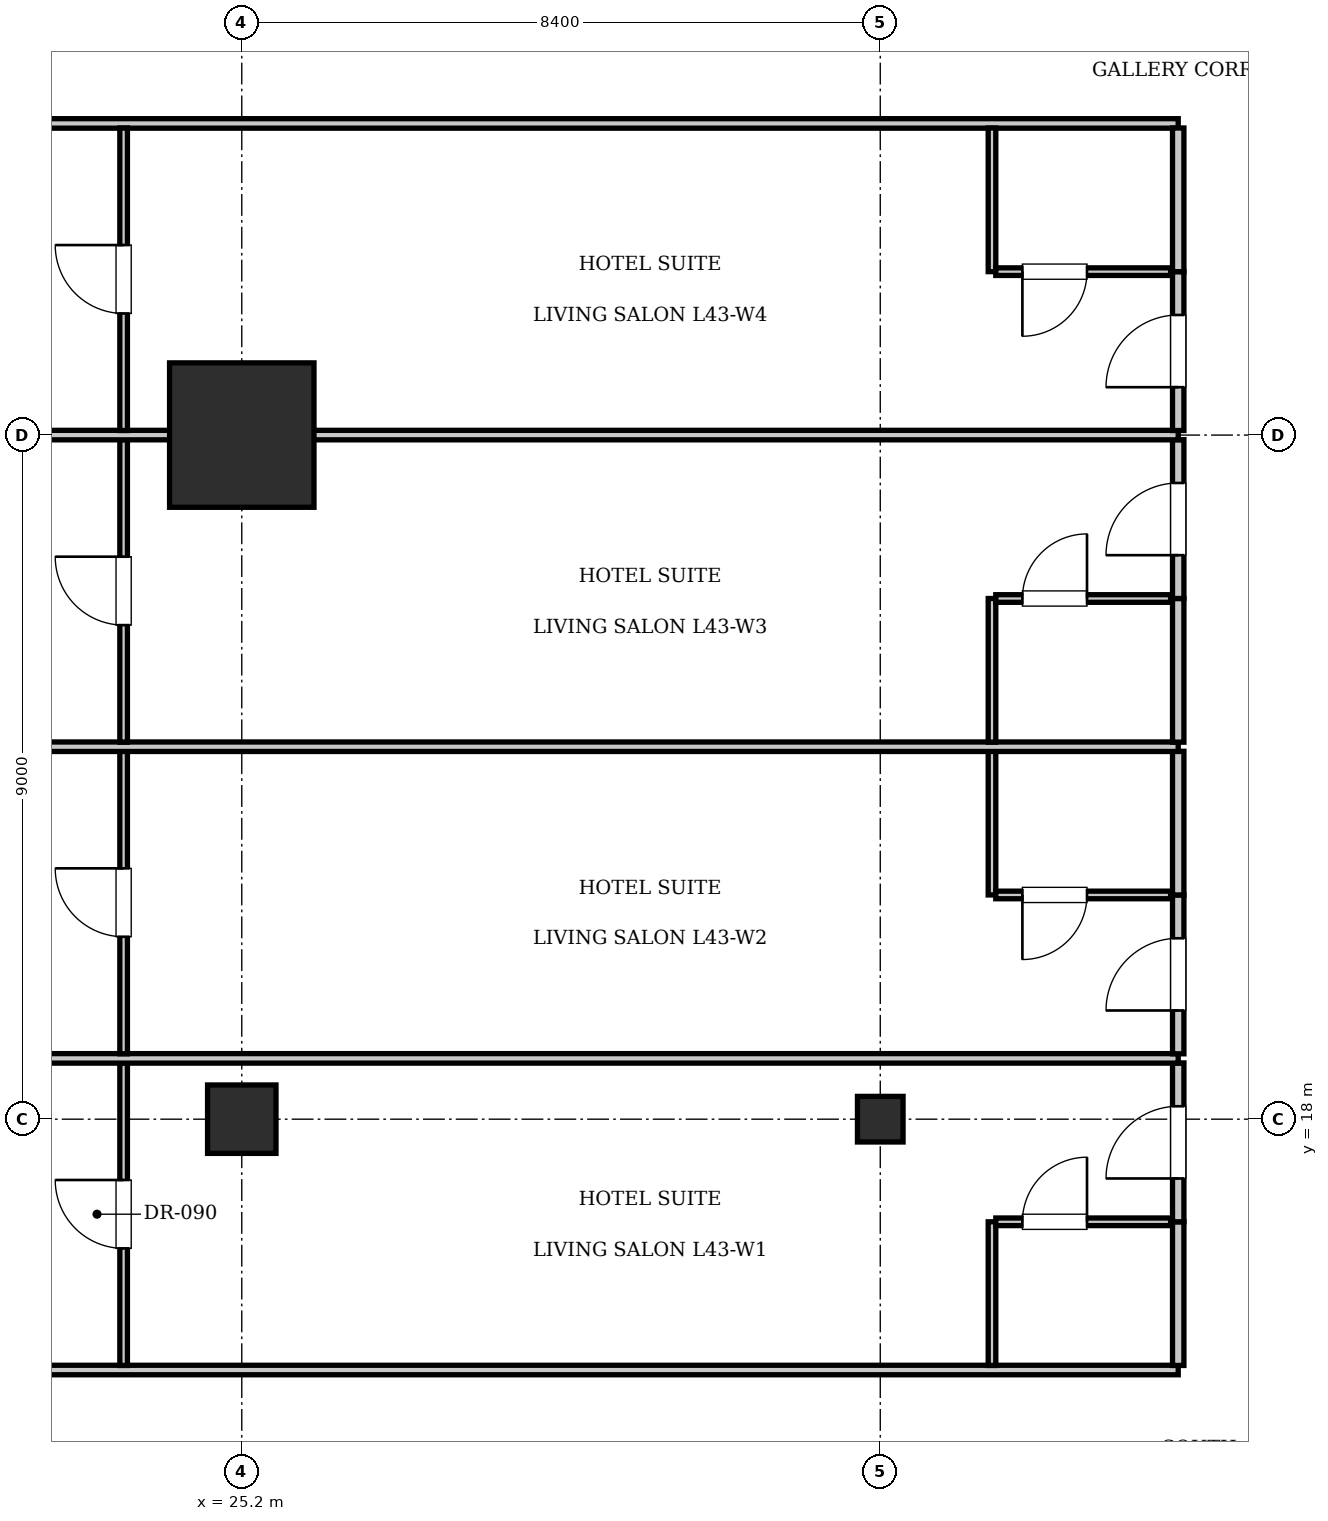
"""IFC4 building model, lengths in metres.
Left out: names, types, materials, properties, quantities, classifications, styles, units other than length and angle.
Written with IfcOpenShell. Run it as: python <this file> out.ifc"""

import sys

from ifc_helpers import new_model, si_unit, direction, frame, frame_2d, origin, origin_2d, place, context, subcontext, project, spatial, rectangle, i_section, extrude, element, fill, save


model = new_model("IFC4")
c1 = context("Model", 3, precision=1e-05, world=origin(), true_north=direction((0.0, 1.0)))
c2 = subcontext(c1, "Body", "Model", "MODEL_VIEW")
j1 = project(units=[si_unit("LENGTHUNIT", "METRE"), si_unit("PLANEANGLEUNIT", "RADIAN")], contexts=[c1])
p1 = place(None, origin())
s1 = spatial("IfcSite", under=j1, at=p1, CompositionType="ELEMENT")
p2 = place(p1, origin())
s2 = spatial("IfcBuilding", under=s1, at=p2, CompositionType="ELEMENT")
p3 = place(p2, frame((0.0, 0.0, 177.45)))
s3 = spatial("IfcBuildingStorey", under=s2, at=p3, CompositionType="ELEMENT", Elevation=177.45)
p4 = place(p3, frame((25.2, 27.0, 0.0), z_axis=(0.0, 0.0, 1.0), x_axis=(1.0, 0.0, 0.0)))
e1 = element("IfcColumn", 1, at=p4, inside=s3, PredefinedType="COLUMN", context=c2, shape_type="SweptSolid", body=[
    extrude(rectangle(XDim=1.9, YDim=1.9, at=origin_2d()), origin(), (0.0, 0.0, 1.0), 3.85),
])
p5 = place(p3, frame((25.2, 18.0, 0.0), z_axis=(0.0, 0.0, 1.0), x_axis=(1.0, 0.0, 0.0)))
e2 = element("IfcColumn", 2, at=p5, inside=s3, PredefinedType="COLUMN", context=c2, shape_type="SweptSolid", body=[
    extrude(rectangle(XDim=0.9, YDim=0.9, at=origin_2d()), origin(), (0.0, 0.0, 1.0), 3.85),
])
p6 = place(p3, frame((33.6, 18.0, 0.0), z_axis=(0.0, 0.0, 1.0), x_axis=(1.0, 0.0, 0.0)))
e3 = element("IfcColumn", 3, at=p6, inside=s3, PredefinedType="COLUMN", context=c2, shape_type="SweptSolid", body=[
    extrude(i_section(OverallWidth=0.6, OverallDepth=0.6, WebThickness=0.025, FlangeThickness=0.038, at=origin_2d()), origin(), (0.0, 0.0, 1.0), 3.85),
])
for number, where, z_axis, x_axis in (
    (4, (13.2, 14.7, 0.0), (0.0, 0.0, 1.0), (1.0, 0.0, 0.0)),
    (5, (13.2, 31.1, 0.0), (0.0, 0.0, 1.0), (1.0, 0.0, 0.0)),
):
    element("IfcWall", number, at=place(p3, frame(where, z_axis=z_axis, x_axis=x_axis)), inside=s3, PredefinedType="PARTITIONING", context=c2, shape_type="SweptSolid", body=[
        extrude(rectangle(XDim=24.32, YDim=0.125, at=frame_2d((12.16, 0.0))), origin(), (0.0, 0.0, 1.0), 3.61),
    ])
p7 = place(p3, frame((37.52, 14.76, 0.0), z_axis=(0.0, 0.0, 1.0), x_axis=(0.0, 1.0, 0.0)))
e6 = element("IfcWall", 6, at=p7, inside=s3, PredefinedType="PARTITIONING", context=c2, shape_type="SweptSolid", body=[
    extrude(rectangle(XDim=1.89, YDim=0.15, at=frame_2d((0.945, 0.0))), origin(), (0.0, 0.0, 1.0), 3.61),
])
p8 = place(p3, frame((37.52, 16.65, 0.0), z_axis=(0.0, 0.0, 1.0), x_axis=(0.0, 1.0, 0.0)))
e7 = element("IfcWall", 7, at=p8, inside=s3, PredefinedType="PARTITIONING", context=c2, shape_type="SweptSolid", body=[
    extrude(rectangle(XDim=2.09, YDim=0.15, at=frame_2d((1.045, 0.0))), origin(), (0.0, 0.0, 1.0), 3.61),
])
p9 = place(p8, frame((0.57, 0.0, 0.0)))
e8 = element("IfcOpeningElement", 8, at=p9, cuts=e7, PredefinedType="OPENING", context=c2, shape_type="SweptSolid", body=[
    extrude(rectangle(XDim=0.95, YDim=2.15, at=frame_2d((0.475, 1.075))), frame((0.0, 0.085, 0.0), z_axis=(0.0, -1.0, 0.0), x_axis=(1.0, 0.0, 0.0)), (0.0, 0.0, 1.0), 0.17),
])
p10 = place(p3, frame((35.07, 14.76, 0.0), z_axis=(0.0, 0.0, 1.0), x_axis=(0.0, 1.0, 0.0)))
e9 = element("IfcWall", 9, at=p10, inside=s3, PredefinedType="PARTITIONING", context=c2, shape_type="SweptSolid", body=[
    extrude(rectangle(XDim=1.89, YDim=0.1, at=frame_2d((0.945, 0.0))), origin(), (0.0, 0.0, 1.0), 3.61),
])
p11 = place(p3, frame((35.12, 16.65, 0.0), z_axis=(0.0, 0.0, 1.0), x_axis=(1.0, 0.0, 0.0)))
e10 = element("IfcWall", 10, at=p11, inside=s3, PredefinedType="PARTITIONING", context=c2, shape_type="SweptSolid", body=[
    extrude(rectangle(XDim=2.3, YDim=0.1, at=frame_2d((1.15, 0.0))), origin(), (0.0, 0.0, 1.0), 3.61),
])
p12 = place(p11, frame((0.35, 0.0, 0.0)))
e11 = element("IfcOpeningElement", 11, at=p12, cuts=e10, PredefinedType="OPENING", context=c2, shape_type="SweptSolid", body=[
    extrude(rectangle(XDim=0.85, YDim=2.1, at=frame_2d((0.425, 1.05))), frame((0.0, 0.06, 0.0), z_axis=(0.0, -1.0, 0.0), x_axis=(1.0, 0.0, 0.0)), (0.0, 0.0, 1.0), 0.12),
])
p13 = place(p3, frame((23.646, 14.76, 0.0), z_axis=(0.0, 0.0, 1.0), x_axis=(0.0, 1.0, 0.0)))
e12 = element("IfcWall", 12, at=p13, inside=s3, PredefinedType="PARTITIONING", context=c2, shape_type="SweptSolid", body=[
    extrude(rectangle(XDim=3.98, YDim=0.1, at=frame_2d((1.99, 0.0))), origin(), (0.0, 0.0, 1.0), 3.61),
])
p14 = place(p13, frame((1.54, 0.0, 0.0)))
e13 = element("IfcOpeningElement", 13, at=p14, cuts=e12, PredefinedType="OPENING", context=c2, shape_type="SweptSolid", body=[
    extrude(rectangle(XDim=0.9, YDim=2.1, at=frame_2d((0.45, 1.05))), frame((0.0, 0.06, 0.0), z_axis=(0.0, -1.0, 0.0), x_axis=(1.0, 0.0, 0.0)), (0.0, 0.0, 1.0), 0.12),
])
p15 = place(p3, frame((13.2, 18.8, 0.0), z_axis=(0.0, 0.0, 1.0), x_axis=(1.0, 0.0, 0.0)))
e14 = element("IfcWall", 14, at=p15, inside=s3, PredefinedType="PARTITIONING", context=c2, shape_type="SweptSolid", body=[
    extrude(rectangle(XDim=24.32, YDim=0.125, at=frame_2d((12.16, 0.0))), origin(), (0.0, 0.0, 1.0), 3.61),
])
p16 = place(p3, frame((37.52, 18.86, 0.0), z_axis=(0.0, 0.0, 1.0), x_axis=(0.0, 1.0, 0.0)))
e15 = element("IfcWall", 15, at=p16, inside=s3, PredefinedType="PARTITIONING", context=c2, shape_type="SweptSolid", body=[
    extrude(rectangle(XDim=2.09, YDim=0.15, at=frame_2d((1.045, 0.0))), origin(), (0.0, 0.0, 1.0), 3.61),
])
p17 = place(p16, frame((0.57, 0.0, 0.0)))
e16 = element("IfcOpeningElement", 16, at=p17, cuts=e15, PredefinedType="OPENING", context=c2, shape_type="SweptSolid", body=[
    extrude(rectangle(XDim=0.95, YDim=2.15, at=frame_2d((0.475, 1.075))), frame((0.0, 0.085, 0.0), z_axis=(0.0, -1.0, 0.0), x_axis=(1.0, 0.0, 0.0)), (0.0, 0.0, 1.0), 0.17),
])
p18 = place(p3, frame((37.52, 20.95, 0.0), z_axis=(0.0, 0.0, 1.0), x_axis=(0.0, 1.0, 0.0)))
e17 = element("IfcWall", 17, at=p18, inside=s3, PredefinedType="PARTITIONING", context=c2, shape_type="SweptSolid", body=[
    extrude(rectangle(XDim=1.89, YDim=0.15, at=frame_2d((0.945, 0.0))), origin(), (0.0, 0.0, 1.0), 3.61),
])
p19 = place(p3, frame((35.07, 20.95, 0.0), z_axis=(0.0, 0.0, 1.0), x_axis=(0.0, 1.0, 0.0)))
e18 = element("IfcWall", 18, at=p19, inside=s3, PredefinedType="PARTITIONING", context=c2, shape_type="SweptSolid", body=[
    extrude(rectangle(XDim=1.89, YDim=0.1, at=frame_2d((0.945, 0.0))), origin(), (0.0, 0.0, 1.0), 3.61),
])
p20 = place(p3, frame((35.12, 20.95, 0.0), z_axis=(0.0, 0.0, 1.0), x_axis=(1.0, 0.0, 0.0)))
e19 = element("IfcWall", 19, at=p20, inside=s3, PredefinedType="PARTITIONING", context=c2, shape_type="SweptSolid", body=[
    extrude(rectangle(XDim=2.3, YDim=0.1, at=frame_2d((1.15, 0.0))), origin(), (0.0, 0.0, 1.0), 3.61),
])
p21 = place(p20, frame((0.35, 0.0, 0.0)))
e20 = element("IfcOpeningElement", 20, at=p21, cuts=e19, PredefinedType="OPENING", context=c2, shape_type="SweptSolid", body=[
    extrude(rectangle(XDim=0.85, YDim=2.1, at=frame_2d((0.425, 1.05))), frame((0.0, 0.06, 0.0), z_axis=(0.0, -1.0, 0.0), x_axis=(1.0, 0.0, 0.0)), (0.0, 0.0, 1.0), 0.12),
])
p22 = place(p3, frame((23.646, 18.86, 0.0), z_axis=(0.0, 0.0, 1.0), x_axis=(0.0, 1.0, 0.0)))
e21 = element("IfcWall", 21, at=p22, inside=s3, PredefinedType="PARTITIONING", context=c2, shape_type="SweptSolid", body=[
    extrude(rectangle(XDim=3.98, YDim=0.1, at=frame_2d((1.99, 0.0))), origin(), (0.0, 0.0, 1.0), 3.61),
])
p23 = place(p22, frame((1.54, 0.0, 0.0)))
e22 = element("IfcOpeningElement", 22, at=p23, cuts=e21, PredefinedType="OPENING", context=c2, shape_type="SweptSolid", body=[
    extrude(rectangle(XDim=0.9, YDim=2.1, at=frame_2d((0.45, 1.05))), frame((0.0, 0.06, 0.0), z_axis=(0.0, -1.0, 0.0), x_axis=(1.0, 0.0, 0.0)), (0.0, 0.0, 1.0), 0.12),
])
p24 = place(p3, frame((13.2, 22.9, 0.0), z_axis=(0.0, 0.0, 1.0), x_axis=(1.0, 0.0, 0.0)))
e23 = element("IfcWall", 23, at=p24, inside=s3, PredefinedType="PARTITIONING", context=c2, shape_type="SweptSolid", body=[
    extrude(rectangle(XDim=24.32, YDim=0.125, at=frame_2d((12.16, 0.0))), origin(), (0.0, 0.0, 1.0), 3.61),
])
p25 = place(p3, frame((37.52, 22.96, 0.0), z_axis=(0.0, 0.0, 1.0), x_axis=(0.0, 1.0, 0.0)))
e24 = element("IfcWall", 24, at=p25, inside=s3, PredefinedType="PARTITIONING", context=c2, shape_type="SweptSolid", body=[
    extrude(rectangle(XDim=1.89, YDim=0.15, at=frame_2d((0.945, 0.0))), origin(), (0.0, 0.0, 1.0), 3.61),
])
p26 = place(p3, frame((37.52, 24.85, 0.0), z_axis=(0.0, 0.0, 1.0), x_axis=(0.0, 1.0, 0.0)))
e25 = element("IfcWall", 25, at=p26, inside=s3, PredefinedType="PARTITIONING", context=c2, shape_type="SweptSolid", body=[
    extrude(rectangle(XDim=2.09, YDim=0.15, at=frame_2d((1.045, 0.0))), origin(), (0.0, 0.0, 1.0), 3.61),
])
p27 = place(p26, frame((0.57, 0.0, 0.0)))
e26 = element("IfcOpeningElement", 26, at=p27, cuts=e25, PredefinedType="OPENING", context=c2, shape_type="SweptSolid", body=[
    extrude(rectangle(XDim=0.95, YDim=2.15, at=frame_2d((0.475, 1.075))), frame((0.0, 0.085, 0.0), z_axis=(0.0, -1.0, 0.0), x_axis=(1.0, 0.0, 0.0)), (0.0, 0.0, 1.0), 0.17),
])
p28 = place(p3, frame((35.07, 22.96, 0.0), z_axis=(0.0, 0.0, 1.0), x_axis=(0.0, 1.0, 0.0)))
e27 = element("IfcWall", 27, at=p28, inside=s3, PredefinedType="PARTITIONING", context=c2, shape_type="SweptSolid", body=[
    extrude(rectangle(XDim=1.89, YDim=0.1, at=frame_2d((0.945, 0.0))), origin(), (0.0, 0.0, 1.0), 3.61),
])
p29 = place(p3, frame((35.12, 24.85, 0.0), z_axis=(0.0, 0.0, 1.0), x_axis=(1.0, 0.0, 0.0)))
e28 = element("IfcWall", 28, at=p29, inside=s3, PredefinedType="PARTITIONING", context=c2, shape_type="SweptSolid", body=[
    extrude(rectangle(XDim=2.3, YDim=0.1, at=frame_2d((1.15, 0.0))), origin(), (0.0, 0.0, 1.0), 3.61),
])
p30 = place(p29, frame((0.35, 0.0, 0.0)))
e29 = element("IfcOpeningElement", 29, at=p30, cuts=e28, PredefinedType="OPENING", context=c2, shape_type="SweptSolid", body=[
    extrude(rectangle(XDim=0.85, YDim=2.1, at=frame_2d((0.425, 1.05))), frame((0.0, 0.06, 0.0), z_axis=(0.0, -1.0, 0.0), x_axis=(1.0, 0.0, 0.0)), (0.0, 0.0, 1.0), 0.12),
])
p31 = place(p3, frame((23.646, 22.96, 0.0), z_axis=(0.0, 0.0, 1.0), x_axis=(0.0, 1.0, 0.0)))
e30 = element("IfcWall", 30, at=p31, inside=s3, PredefinedType="PARTITIONING", context=c2, shape_type="SweptSolid", body=[
    extrude(rectangle(XDim=3.98, YDim=0.1, at=frame_2d((1.99, 0.0))), origin(), (0.0, 0.0, 1.0), 3.61),
])
p32 = place(p31, frame((1.54, 0.0, 0.0)))
e31 = element("IfcOpeningElement", 31, at=p32, cuts=e30, PredefinedType="OPENING", context=c2, shape_type="SweptSolid", body=[
    extrude(rectangle(XDim=0.9, YDim=2.1, at=frame_2d((0.45, 1.05))), frame((0.0, 0.06, 0.0), z_axis=(0.0, -1.0, 0.0), x_axis=(1.0, 0.0, 0.0)), (0.0, 0.0, 1.0), 0.12),
])
p33 = place(p3, frame((13.2, 27.0, 0.0), z_axis=(0.0, 0.0, 1.0), x_axis=(1.0, 0.0, 0.0)))
e32 = element("IfcWall", 32, at=p33, inside=s3, PredefinedType="PARTITIONING", context=c2, shape_type="SweptSolid", body=[
    extrude(rectangle(XDim=24.32, YDim=0.125, at=frame_2d((12.16, 0.0))), origin(), (0.0, 0.0, 1.0), 2.41),
])
p34 = place(p3, frame((37.52, 27.06, 0.0), z_axis=(0.0, 0.0, 1.0), x_axis=(0.0, 1.0, 0.0)))
e33 = element("IfcWall", 33, at=p34, inside=s3, PredefinedType="PARTITIONING", context=c2, shape_type="SweptSolid", body=[
    extrude(rectangle(XDim=2.09, YDim=0.15, at=frame_2d((1.045, 0.0))), origin(), (0.0, 0.0, 1.0), 3.61),
])
p35 = place(p34, frame((0.57, 0.0, 0.0)))
e34 = element("IfcOpeningElement", 34, at=p35, cuts=e33, PredefinedType="OPENING", context=c2, shape_type="SweptSolid", body=[
    extrude(rectangle(XDim=0.95, YDim=2.15, at=frame_2d((0.475, 1.075))), frame((0.0, 0.085, 0.0), z_axis=(0.0, -1.0, 0.0), x_axis=(1.0, 0.0, 0.0)), (0.0, 0.0, 1.0), 0.17),
])
p36 = place(p3, frame((37.52, 29.15, 0.0), z_axis=(0.0, 0.0, 1.0), x_axis=(0.0, 1.0, 0.0)))
e35 = element("IfcWall", 35, at=p36, inside=s3, PredefinedType="PARTITIONING", context=c2, shape_type="SweptSolid", body=[
    extrude(rectangle(XDim=1.89, YDim=0.15, at=frame_2d((0.945, 0.0))), origin(), (0.0, 0.0, 1.0), 3.61),
])
p37 = place(p3, frame((35.07, 29.15, 0.0), z_axis=(0.0, 0.0, 1.0), x_axis=(0.0, 1.0, 0.0)))
e36 = element("IfcWall", 36, at=p37, inside=s3, PredefinedType="PARTITIONING", context=c2, shape_type="SweptSolid", body=[
    extrude(rectangle(XDim=1.89, YDim=0.1, at=frame_2d((0.945, 0.0))), origin(), (0.0, 0.0, 1.0), 3.61),
])
p38 = place(p3, frame((35.12, 29.15, 0.0), z_axis=(0.0, 0.0, 1.0), x_axis=(1.0, 0.0, 0.0)))
e37 = element("IfcWall", 37, at=p38, inside=s3, PredefinedType="PARTITIONING", context=c2, shape_type="SweptSolid", body=[
    extrude(rectangle(XDim=2.3, YDim=0.1, at=frame_2d((1.15, 0.0))), origin(), (0.0, 0.0, 1.0), 3.61),
])
p39 = place(p38, frame((0.35, 0.0, 0.0)))
e38 = element("IfcOpeningElement", 38, at=p39, cuts=e37, PredefinedType="OPENING", context=c2, shape_type="SweptSolid", body=[
    extrude(rectangle(XDim=0.85, YDim=2.1, at=frame_2d((0.425, 1.05))), frame((0.0, 0.06, 0.0), z_axis=(0.0, -1.0, 0.0), x_axis=(1.0, 0.0, 0.0)), (0.0, 0.0, 1.0), 0.12),
])
p40 = place(p3, frame((23.646, 27.06, 0.0), z_axis=(0.0, 0.0, 1.0), x_axis=(0.0, 1.0, 0.0)))
e39 = element("IfcWall", 39, at=p40, inside=s3, PredefinedType="PARTITIONING", context=c2, shape_type="SweptSolid", body=[
    extrude(rectangle(XDim=3.98, YDim=0.1, at=frame_2d((1.99, 0.0))), origin(), (0.0, 0.0, 1.0), 3.61),
])
p41 = place(p40, frame((1.54, 0.0, 0.0)))
e40 = element("IfcOpeningElement", 40, at=p41, cuts=e39, PredefinedType="OPENING", context=c2, shape_type="SweptSolid", body=[
    extrude(rectangle(XDim=0.9, YDim=2.1, at=frame_2d((0.45, 1.05))), frame((0.0, 0.06, 0.0), z_axis=(0.0, -1.0, 0.0), x_axis=(1.0, 0.0, 0.0)), (0.0, 0.0, 1.0), 0.12),
])
p42 = place(p12, origin())
e41 = element("IfcDoor", 41, at=p42, inside=s3, OperationType="SINGLE_SWING_RIGHT", PredefinedType="DOOR", context=c2, shape_type="SweptSolid", body=[
    extrude(rectangle(XDim=0.85, YDim=2.1, at=frame_2d((0.425, 1.05))), frame((0.0, 0.025, 0.0), z_axis=(0.0, -1.0, 0.0), x_axis=(1.0, 0.0, 0.0)), (0.0, 0.0, 1.0), 0.05),
])
fill(e11, e41)
p43 = place(p9, origin())
e42 = element("IfcDoor", 42, at=p43, inside=s3, OperationType="SINGLE_SWING_LEFT", PredefinedType="DOOR", context=c2, shape_type="SweptSolid", body=[
    extrude(rectangle(XDim=0.95, YDim=2.15, at=frame_2d((0.475, 1.075))), frame((0.0, 0.025, 0.0), z_axis=(0.0, -1.0, 0.0), x_axis=(1.0, 0.0, 0.0)), (0.0, 0.0, 1.0), 0.05),
])
fill(e8, e42)
p44 = place(p14, origin())
e43 = element("IfcDoor", 43, at=p44, inside=s3, OperationType="SINGLE_SWING_RIGHT", PredefinedType="DOOR", context=c2, shape_type="SweptSolid", body=[
    extrude(rectangle(XDim=0.9, YDim=2.1, at=frame_2d((0.45, 1.05))), frame((0.0, 0.025, 0.0), z_axis=(0.0, -1.0, 0.0), x_axis=(1.0, 0.0, 0.0)), (0.0, 0.0, 1.0), 0.05),
])
fill(e13, e43)
p45 = place(p21, frame((0.85, 0.0, 0.0), z_axis=(0.0, 0.0, 1.0), x_axis=(-1.0, 0.0, 0.0)))
e44 = element("IfcDoor", 44, at=p45, inside=s3, OperationType="SINGLE_SWING_RIGHT", PredefinedType="DOOR", context=c2, shape_type="SweptSolid", body=[
    extrude(rectangle(XDim=0.85, YDim=2.1, at=frame_2d((0.425, 1.05))), frame((0.0, 0.025, 0.0), z_axis=(0.0, -1.0, 0.0), x_axis=(1.0, 0.0, 0.0)), (0.0, 0.0, 1.0), 0.05),
])
fill(e20, e44)
p46 = place(p17, origin())
e45 = element("IfcDoor", 45, at=p46, inside=s3, OperationType="SINGLE_SWING_LEFT", PredefinedType="DOOR", context=c2, shape_type="SweptSolid", body=[
    extrude(rectangle(XDim=0.95, YDim=2.15, at=frame_2d((0.475, 1.075))), frame((0.0, 0.025, 0.0), z_axis=(0.0, -1.0, 0.0), x_axis=(1.0, 0.0, 0.0)), (0.0, 0.0, 1.0), 0.05),
])
fill(e16, e45)
p47 = place(p23, origin())
e46 = element("IfcDoor", 46, at=p47, inside=s3, OperationType="SINGLE_SWING_RIGHT", PredefinedType="DOOR", context=c2, shape_type="SweptSolid", body=[
    extrude(rectangle(XDim=0.9, YDim=2.1, at=frame_2d((0.45, 1.05))), frame((0.0, 0.025, 0.0), z_axis=(0.0, -1.0, 0.0), x_axis=(1.0, 0.0, 0.0)), (0.0, 0.0, 1.0), 0.05),
])
fill(e22, e46)
p48 = place(p30, origin())
e47 = element("IfcDoor", 47, at=p48, inside=s3, OperationType="SINGLE_SWING_RIGHT", PredefinedType="DOOR", context=c2, shape_type="SweptSolid", body=[
    extrude(rectangle(XDim=0.85, YDim=2.1, at=frame_2d((0.425, 1.05))), frame((0.0, 0.025, 0.0), z_axis=(0.0, -1.0, 0.0), x_axis=(1.0, 0.0, 0.0)), (0.0, 0.0, 1.0), 0.05),
])
fill(e29, e47)
p49 = place(p27, origin())
e48 = element("IfcDoor", 48, at=p49, inside=s3, OperationType="SINGLE_SWING_LEFT", PredefinedType="DOOR", context=c2, shape_type="SweptSolid", body=[
    extrude(rectangle(XDim=0.95, YDim=2.15, at=frame_2d((0.475, 1.075))), frame((0.0, 0.025, 0.0), z_axis=(0.0, -1.0, 0.0), x_axis=(1.0, 0.0, 0.0)), (0.0, 0.0, 1.0), 0.05),
])
fill(e26, e48)
p50 = place(p32, origin())
e49 = element("IfcDoor", 49, at=p50, inside=s3, OperationType="SINGLE_SWING_RIGHT", PredefinedType="DOOR", context=c2, shape_type="SweptSolid", body=[
    extrude(rectangle(XDim=0.9, YDim=2.1, at=frame_2d((0.45, 1.05))), frame((0.0, 0.025, 0.0), z_axis=(0.0, -1.0, 0.0), x_axis=(1.0, 0.0, 0.0)), (0.0, 0.0, 1.0), 0.05),
])
fill(e31, e49)
p51 = place(p39, frame((0.85, 0.0, 0.0), z_axis=(0.0, 0.0, 1.0), x_axis=(-1.0, 0.0, 0.0)))
e50 = element("IfcDoor", 50, at=p51, inside=s3, OperationType="SINGLE_SWING_RIGHT", PredefinedType="DOOR", context=c2, shape_type="SweptSolid", body=[
    extrude(rectangle(XDim=0.85, YDim=2.1, at=frame_2d((0.425, 1.05))), frame((0.0, 0.025, 0.0), z_axis=(0.0, -1.0, 0.0), x_axis=(1.0, 0.0, 0.0)), (0.0, 0.0, 1.0), 0.05),
])
fill(e38, e50)
p52 = place(p35, origin())
e51 = element("IfcDoor", 51, at=p52, inside=s3, OperationType="SINGLE_SWING_LEFT", PredefinedType="DOOR", context=c2, shape_type="SweptSolid", body=[
    extrude(rectangle(XDim=0.95, YDim=2.15, at=frame_2d((0.475, 1.075))), frame((0.0, 0.025, 0.0), z_axis=(0.0, -1.0, 0.0), x_axis=(1.0, 0.0, 0.0)), (0.0, 0.0, 1.0), 0.05),
])
fill(e34, e51)
p53 = place(p41, origin())
e52 = element("IfcDoor", 52, at=p53, inside=s3, OperationType="SINGLE_SWING_RIGHT", PredefinedType="DOOR", context=c2, shape_type="SweptSolid", body=[
    extrude(rectangle(XDim=0.9, YDim=2.1, at=frame_2d((0.45, 1.05))), frame((0.0, 0.025, 0.0), z_axis=(0.0, -1.0, 0.0), x_axis=(1.0, 0.0, 0.0)), (0.0, 0.0, 1.0), 0.05),
])
fill(e40, e52)
save(model, sys.argv[1])
